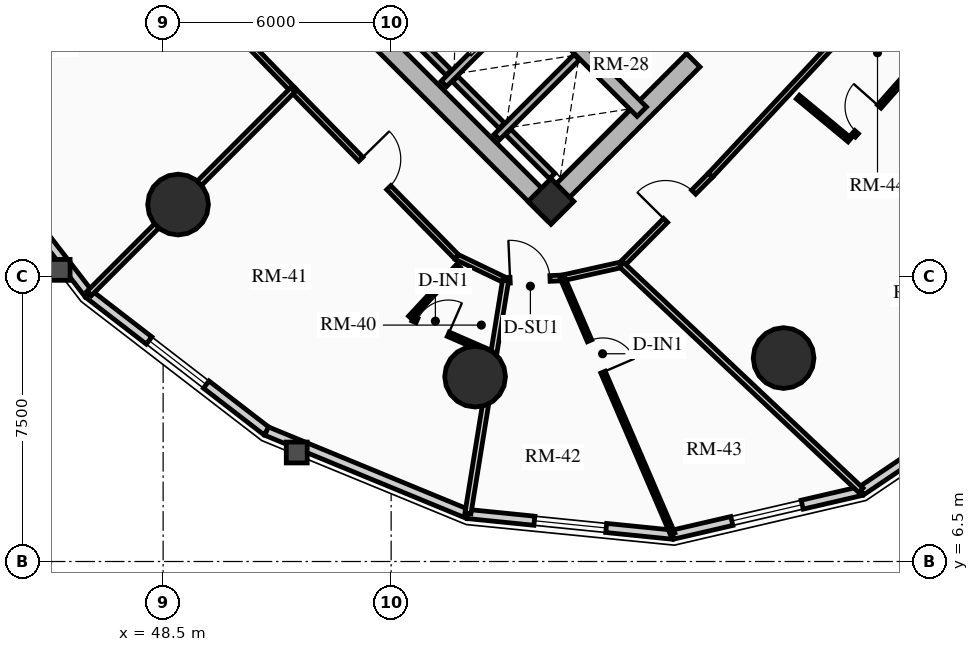
"""IFC4 building model, lengths in metres.
Left out: names, types, materials, properties, quantities, classifications, styles, units other than length and angle.
Written with IfcOpenShell. Run it as: python <this file> out.ifc"""

import sys

from ifc_helpers import new_model, si_unit, direction, frame, frame_2d, origin, origin_2d, place, context, subcontext, project, spatial, rectangle, circle, extrude, source, transform, mapped, element, fill, save


model = new_model("IFC4")
c1 = context("Model", 3, precision=1e-05, world=origin(), true_north=direction((0.0, 1.0)))
c2 = subcontext(c1, "Body", "Model", "MODEL_VIEW")
j1 = project(units=[si_unit("LENGTHUNIT", "METRE"), si_unit("PLANEANGLEUNIT", "RADIAN")], contexts=[c1])
p1 = place(None, origin())
s1 = spatial("IfcSite", under=j1, at=p1, CompositionType="ELEMENT")
p2 = place(p1, origin())
s2 = spatial("IfcBuilding", under=s1, at=p2, CompositionType="ELEMENT")
p3 = place(p2, frame((0.0, 0.0, 36.55)))
s3 = spatial("IfcBuildingStorey", under=s2, at=p3, CompositionType="ELEMENT", Elevation=36.55)
p4 = place(p3, frame((58.773, 15.661, 0.0), z_axis=(0.0, 0.0, 1.0), x_axis=(-0.707106781187, 0.707106781187, 0.0)))
e1 = element("IfcWall", 1, at=p4, inside=s3, PredefinedType="SHEAR", context=c2, shape_type="SweptSolid", body=[
    extrude(rectangle(XDim=14.3, YDim=0.5, at=frame_2d((7.15, 0.0))), origin(), (0.0, 0.0, 1.0), 2.91),
])
p5 = place(p3, frame((58.596, 15.838, 0.0), z_axis=(0.0, 0.0, 1.0), x_axis=(0.707106781187, 0.707106781187, 0.0)))
e2 = element("IfcWall", 2, at=p5, inside=s3, PredefinedType="SHEAR", context=c2, shape_type="SweptSolid", body=[
    extrude(rectangle(XDim=10.7, YDim=0.5, at=frame_2d((5.35, 0.0))), origin(), (0.0, 0.0, 1.0), 2.91),
])
m1 = source(origin(), c2, "Body", "SweptSolid", [
    extrude(rectangle(XDim=1.5, YDim=2.02, at=frame_2d((0.75, 1.01))), frame((0.0, 0.26, 0.0), z_axis=(0.0, -1.0, 0.0), x_axis=(1.0, 0.0, 0.0)), (0.0, 0.0, 1.0), 0.52),
])
p6 = place(p5, frame((5.45, 0.0, 0.0)))
e3 = element("IfcOpeningElement", 3, at=p6, cuts=e2, PredefinedType="OPENING", context=c2, shape_type="MappedRepresentation", body=[
    mapped(m1, transform((0.0, 0.0, 0.0), x_axis=(1.0, 0.0, 0.0), y_axis=(0.0, 1.0, 0.0), z_axis=(0.0, 0.0, 1.0), scale=1.0)),
])
p7 = place(p3, frame((61.096, 18.338, 0.0), z_axis=(0.0, 0.0, 1.0), x_axis=(-0.707106781187, 0.707106781187, 0.0)))
e4 = element("IfcWall", 4, at=p7, inside=s3, PredefinedType="SHEAR", context=c2, shape_type="SweptSolid", body=[
    extrude(rectangle(XDim=13.8, YDim=0.35, at=frame_2d((6.9, 0.0))), origin(), (0.0, 0.0, 1.0), 2.91),
])
m2 = source(origin(), c2, "Body", "SweptSolid", [
    extrude(rectangle(XDim=1.1, YDim=2.015, at=frame_2d((0.55, 1.007))), frame((0.0, 0.185, 0.0), z_axis=(0.0, -1.0, 0.0), x_axis=(1.0, 0.0, 0.0)), (0.0, 0.0, 1.0), 0.37),
])
p8 = place(p7, frame((4.9, 0.0, 0.0)))
e5 = element("IfcOpeningElement", 5, at=p8, cuts=e4, PredefinedType="OPENING", context=c2, shape_type="MappedRepresentation", body=[
    mapped(m2, transform((0.0, 0.0, 0.0), x_axis=(1.0, 0.0, 0.0), y_axis=(0.0, 1.0, 0.0), z_axis=(0.0, 0.0, 1.0), scale=1.0)),
])
m3 = source(origin(), c2, "Body", "SweptSolid", [
    extrude(rectangle(XDim=1.15, YDim=2.02, at=frame_2d((0.575, 1.01))), frame((0.0, 0.185, 0.0), z_axis=(0.0, -1.0, 0.0), x_axis=(1.0, 0.0, 0.0)), (0.0, 0.0, 1.0), 0.37),
])
p9 = place(p7, frame((7.32, 0.0, 0.0)))
e6 = element("IfcOpeningElement", 6, at=p9, cuts=e4, PredefinedType="OPENING", context=c2, shape_type="MappedRepresentation", body=[
    mapped(m3, transform((0.0, 0.0, 0.0), x_axis=(1.0, 0.0, 0.0), y_axis=(0.0, 1.0, 0.0), z_axis=(0.0, 0.0, 1.0), scale=1.0)),
])
p10 = place(p3, frame((58.706, 15.976, 0.0), z_axis=(0.0, 0.0, 1.0), x_axis=(0.707106781187, 0.707106781187, 0.0)))
e7 = element("IfcColumn", 7, at=p10, inside=s3, PredefinedType="COLUMN", context=c2, shape_type="SweptSolid", body=[
    extrude(rectangle(XDim=0.85, YDim=0.85, at=origin_2d()), origin(), (0.0, 0.0, 1.0), 2.91),
])
for number, where, z_axis, x_axis in (
    (8, (48.893, 15.893, 0.0), (0.0, 0.0, 1.0), (1.0, 0.0, 0.0)),
    (9, (56.709, 11.365, 0.0), (0.0, 0.0, 1.0), (1.0, 0.0, 0.0)),
    (10, (64.827, 11.854, 0.0), (0.0, 0.0, 1.0), (1.0, 0.0, 0.0)),
):
    element("IfcColumn", number, at=place(p3, frame(where, z_axis=z_axis, x_axis=x_axis)), inside=s3, PredefinedType="USERDEFINED", context=c2, shape_type="SweptSolid", body=[
        extrude(circle(Radius=0.8, at=origin_2d()), origin(), (0.0, 0.0, 1.0), 2.91),
    ])
p11 = place(p3, frame((46.541, 13.541, 0.0), z_axis=(0.0, 0.0, 1.0), x_axis=(-0.610494906082, 0.792020182601, 0.0)))
e11 = element("IfcWall", 11, at=p11, inside=s3, PredefinedType="SOLIDWALL", context=c2, shape_type="SweptSolid", body=[
    extrude(rectangle(XDim=5.911, YDim=0.24, at=frame_2d((2.956, 0.0))), origin(), (0.0, 0.0, 1.0), 2.073),
])
p12 = place(p3, frame((51.222, 9.932, 0.0), z_axis=(0.0, 0.0, 1.0), x_axis=(-0.792020182601, 0.610494906082, 0.0)))
e12 = element("IfcWall", 12, at=p12, inside=s3, PredefinedType="SOLIDWALL", context=c2, shape_type="SweptSolid", body=[
    extrude(rectangle(XDim=5.911, YDim=0.24, at=frame_2d((2.956, 0.0))), origin(), (0.0, 0.0, 1.0), 2.073),
])
m4 = source(origin(), c2, "Body", "SweptSolid", [
    extrude(rectangle(XDim=1.9, YDim=1.35, at=frame_2d((0.95, 0.675))), frame((0.0, 0.13, 0.0), z_axis=(0.0, -1.0, 0.0), x_axis=(1.0, 0.0, 0.0)), (0.0, 0.0, 1.0), 0.26),
])
p13 = place(p12, frame((2.005, 0.0, 0.65)))
e13 = element("IfcOpeningElement", 13, at=p13, cuts=e12, PredefinedType="OPENING", context=c2, shape_type="MappedRepresentation", body=[
    mapped(m4, transform((0.0, 0.0, 0.0), x_axis=(1.0, 0.0, 0.0), y_axis=(0.0, 1.0, 0.0), z_axis=(0.0, 0.0, 1.0), scale=1.0)),
])
p14 = place(p3, frame((56.518, 7.749, 0.0), z_axis=(0.0, 0.0, 1.0), x_axis=(-0.924542988536, 0.381077764176, 0.0)))
e14 = element("IfcWall", 14, at=p14, inside=s3, PredefinedType="SOLIDWALL", context=c2, shape_type="SweptSolid", body=[
    extrude(rectangle(XDim=5.728, YDim=0.24, at=frame_2d((2.864, 0.0))), origin(), (0.0, 0.0, 1.0), 2.073),
])
p15 = place(p3, frame((61.91, 7.206, 0.0), z_axis=(0.0, 0.0, 1.0), x_axis=(-0.994968263437, 0.100190592135, 0.0)))
e15 = element("IfcWall", 15, at=p15, inside=s3, PredefinedType="SOLIDWALL", context=c2, shape_type="SweptSolid", body=[
    extrude(rectangle(XDim=5.419, YDim=0.24, at=frame_2d((2.71, 0.0))), origin(), (0.0, 0.0, 1.0), 2.073),
])
p16 = place(p15, frame((1.76, 0.0, 0.65)))
e16 = element("IfcOpeningElement", 16, at=p16, cuts=e15, PredefinedType="OPENING", context=c2, shape_type="MappedRepresentation", body=[
    mapped(m4, transform((0.0, 0.0, 0.0), x_axis=(1.0, 0.0, 0.0), y_axis=(0.0, 1.0, 0.0), z_axis=(0.0, 0.0, 1.0), scale=1.0)),
])
p17 = place(p3, frame((66.871, 8.356, 0.0), z_axis=(0.0, 0.0, 1.0), x_axis=(-0.974167686491, -0.22582585901, 0.0)))
e17 = element("IfcWall", 17, at=p17, inside=s3, PredefinedType="SOLIDWALL", context=c2, shape_type="SweptSolid", body=[
    extrude(rectangle(XDim=5.092, YDim=0.24, at=frame_2d((2.546, 0.0))), origin(), (0.0, 0.0, 1.0), 2.073),
])
p18 = place(p17, frame((1.596, 0.0, 0.65)))
e18 = element("IfcOpeningElement", 18, at=p18, cuts=e17, PredefinedType="OPENING", context=c2, shape_type="MappedRepresentation", body=[
    mapped(m4, transform((0.0, 0.0, 0.0), x_axis=(1.0, 0.0, 0.0), y_axis=(0.0, 1.0, 0.0), z_axis=(0.0, 0.0, 1.0), scale=1.0)),
])
p19 = place(p3, frame((70.914, 11.086, 0.0), z_axis=(0.0, 0.0, 1.0), x_axis=(-0.828748297084, -0.559621532896, 0.0)))
e19 = element("IfcWall", 19, at=p19, inside=s3, PredefinedType="SOLIDWALL", context=c2, shape_type="SweptSolid", body=[
    extrude(rectangle(XDim=4.879, YDim=0.24, at=frame_2d((2.439, 0.0))), origin(), (0.0, 0.0, 1.0), 2.073),
])
p20 = place(p3, frame((55.888, 19.069, 0.0), z_axis=(0.0, 0.0, 1.0), x_axis=(0.707106781187, 0.707106781187, 0.0)))
e20 = element("IfcWall", 20, at=p20, inside=s3, PredefinedType="SHEAR", context=c2, shape_type="SweptSolid", body=[
    extrude(rectangle(XDim=2.97, YDim=0.2, at=frame_2d((1.485, 0.0))), origin(), (0.0, 0.0, 1.0), 2.91),
])
p21 = place(p3, frame((56.015, 19.366, 0.0), z_axis=(0.0, 0.0, 1.0), x_axis=(-0.707106781187, 0.707106781187, 0.0)))
e21 = element("IfcWall", 21, at=p21, inside=s3, PredefinedType="SHEAR", context=c2, shape_type="SweptSolid", body=[
    extrude(rectangle(XDim=2.44, YDim=0.2, at=frame_2d((1.22, 0.0))), origin(), (0.0, 0.0, 1.0), 2.91),
])
p22 = place(p3, frame((57.284, 17.673, 0.0), z_axis=(0.0, 0.0, 1.0), x_axis=(0.707147878904, 0.70706568108, 0.0)))
e22 = element("IfcWall", 22, at=p22, inside=s3, PredefinedType="SHEAR", context=c2, shape_type="SweptSolid", body=[
    extrude(rectangle(XDim=2.97, YDim=0.2, at=frame_2d((1.485, 0.0))), origin(), (0.0, 0.0, 1.0), 2.91),
])
p23 = place(p3, frame((57.412, 17.97, 0.0), z_axis=(0.0, 0.0, 1.0), x_axis=(-0.707106781187, 0.707106781187, 0.0)))
e23 = element("IfcWall", 23, at=p23, inside=s3, PredefinedType="SHEAR", context=c2, shape_type="SweptSolid", body=[
    extrude(rectangle(XDim=1.735, YDim=0.2, at=frame_2d((0.867, 0.0))), origin(), (0.0, 0.0, 1.0), 2.91),
])
p24 = place(p3, frame((58.737, 16.644, 0.0), z_axis=(0.0, 0.0, 1.0), x_axis=(-0.707032117043, 0.707181437447, 0.0)))
e24 = element("IfcWall", 24, at=p24, inside=s3, PredefinedType="SHEAR", context=c2, shape_type="SweptSolid", body=[
    extrude(rectangle(XDim=1.635, YDim=0.2, at=frame_2d((0.817, 0.0))), origin(), (0.0, 0.0, 1.0), 2.91),
])
p25 = place(p3, frame((47.706, 23.253, 0.0), z_axis=(0.0, 0.0, 1.0), x_axis=(0.696179266346, -0.717867974707, 0.0)))
e25 = element("IfcWall", 25, at=p25, inside=s3, PredefinedType="PARTITIONING", context=c2, shape_type="SweptSolid", body=[
    extrude(rectangle(XDim=6.045, YDim=0.15, at=frame_2d((3.022, 0.0))), origin(), (0.0, 0.0, 1.0), 2.635),
])
m5 = source(origin(), c2, "Body", "SweptSolid", [
    extrude(rectangle(XDim=1.05, YDim=2.015, at=frame_2d((0.525, 1.007))), frame((0.0, 0.085, 0.0), z_axis=(0.0, -1.0, 0.0), x_axis=(1.0, 0.0, 0.0)), (0.0, 0.0, 1.0), 0.17),
])
p26 = place(p25, frame((2.497, 0.0, 0.0)))
e26 = element("IfcOpeningElement", 26, at=p26, cuts=e25, PredefinedType="OPENING", context=c2, shape_type="MappedRepresentation", body=[
    mapped(m5, transform((0.0, 0.0, 0.0), x_axis=(1.0, 0.0, 0.0), y_axis=(0.0, 1.0, 0.0), z_axis=(0.0, 0.0, 1.0), scale=1.0)),
])
p27 = place(p3, frame((51.914, 18.914, 0.0), z_axis=(0.0, 0.0, 1.0), x_axis=(0.699999313799, -0.714143515465, 0.0)))
e27 = element("IfcWall", 27, at=p27, inside=s3, PredefinedType="PARTITIONING", context=c2, shape_type="SweptSolid", body=[
    extrude(rectangle(XDim=6.162, YDim=0.15, at=frame_2d((3.081, 0.0))), origin(), (0.0, 0.0, 1.0), 2.159),
])
p28 = place(p27, frame((2.556, 0.0, 0.0)))
e28 = element("IfcOpeningElement", 28, at=p28, cuts=e27, PredefinedType="OPENING", context=c2, shape_type="MappedRepresentation", body=[
    mapped(m5, transform((0.0, 0.0, 0.0), x_axis=(1.0, 0.0, 0.0), y_axis=(0.0, 1.0, 0.0), z_axis=(0.0, 0.0, 1.0), scale=1.0)),
])
p29 = place(p3, frame((56.227, 14.513, 0.0), z_axis=(0.0, 0.0, 1.0), x_axis=(0.901477579283, -0.432825801044, 0.0)))
e29 = element("IfcWall", 29, at=p29, inside=s3, PredefinedType="PARTITIONING", context=c2, shape_type="SweptSolid", body=[
    extrude(rectangle(XDim=1.424, YDim=0.15, at=frame_2d((0.712, 0.0))), origin(), (0.0, 0.0, 1.0), 2.205),
])
p30 = place(p3, frame((57.511, 13.897, 0.0), z_axis=(0.0, 0.0, 1.0), x_axis=(0.999024538494, 0.044158481476, 0.0)))
e30 = element("IfcWall", 30, at=p30, inside=s3, PredefinedType="PARTITIONING", context=c2, shape_type="SweptSolid", body=[
    extrude(rectangle(XDim=1.498, YDim=0.15, at=frame_2d((0.749, 0.0))), origin(), (0.0, 0.0, 1.0), 2.159),
])
p31 = place(p30, frame((0.12, 0.0, 0.0)))
e31 = element("IfcOpeningElement", 31, at=p31, cuts=e30, PredefinedType="OPENING", context=c2, shape_type="MappedRepresentation", body=[
    mapped(m5, transform((0.0, 0.0, 0.0), x_axis=(1.0, 0.0, 0.0), y_axis=(0.0, 1.0, 0.0), z_axis=(0.0, 0.0, 1.0), scale=1.0)),
])
p32 = place(p3, frame((59.008, 13.963, 0.0), z_axis=(0.0, 0.0, 1.0), x_axis=(0.976020856791, 0.21767702476, 0.0)))
e32 = element("IfcWall", 32, at=p32, inside=s3, PredefinedType="PARTITIONING", context=c2, shape_type="SweptSolid", body=[
    extrude(rectangle(XDim=1.593, YDim=0.15, at=frame_2d((0.796, 0.0))), origin(), (0.0, 0.0, 1.0), 2.205),
])
p33 = place(p3, frame((60.562, 14.31, 0.0), z_axis=(0.0, 0.0, 1.0), x_axis=(0.704566236161, 0.709638230975, 0.0)))
e33 = element("IfcWall", 33, at=p33, inside=s3, PredefinedType="PARTITIONING", context=c2, shape_type="SweptSolid", body=[
    extrude(rectangle(XDim=3.321, YDim=0.15, at=frame_2d((1.661, 0.0))), origin(), (0.0, 0.0, 1.0), 2.159),
])
p34 = place(p33, frame((1.643, 0.0, 0.0)))
e34 = element("IfcOpeningElement", 34, at=p34, cuts=e33, PredefinedType="OPENING", context=c2, shape_type="MappedRepresentation", body=[
    mapped(m5, transform((0.0, 0.0, 0.0), x_axis=(1.0, 0.0, 0.0), y_axis=(0.0, 1.0, 0.0), z_axis=(0.0, 0.0, 1.0), scale=1.0)),
])
p35 = place(p3, frame((62.903, 16.667, 0.0), z_axis=(0.0, 0.0, 1.0), x_axis=(0.682371947497, 0.731005147225, 0.0)))
e35 = element("IfcWall", 35, at=p35, inside=s3, PredefinedType="PARTITIONING", context=c2, shape_type="SweptSolid", body=[
    extrude(rectangle(XDim=6.642, YDim=0.15, at=frame_2d((3.321, 0.0))), origin(), (0.0, 0.0, 1.0), 2.159),
])
p36 = place(p3, frame((51.914, 18.914, 0.0), z_axis=(0.0, 0.0, 1.0), x_axis=(-0.707106781187, -0.707106781187, 0.0)))
e36 = element("IfcWall", 36, at=p36, inside=s3, PredefinedType="PARTITIONING", context=c2, shape_type="SweptSolid", body=[
    extrude(rectangle(XDim=7.579, YDim=0.16, at=frame_2d((3.79, 0.0))), origin(), (0.0, 0.0, 1.0), 2.073),
])
p37 = place(p3, frame((57.511, 13.897, 0.0), z_axis=(0.0, 0.0, 1.0), x_axis=(-0.159485929017, -0.987200201806, 0.0)))
e37 = element("IfcWall", 37, at=p37, inside=s3, PredefinedType="PARTITIONING", context=c2, shape_type="SweptSolid", body=[
    extrude(rectangle(XDim=6.207, YDim=0.16, at=frame_2d((3.104, 0.0))), origin(), (0.0, 0.0, 1.0), 2.073),
])
p38 = place(p3, frame((60.562, 14.31, 0.0), z_axis=(0.0, 0.0, 1.0), x_axis=(0.727781661561, -0.685808904211, 0.0)))
e38 = element("IfcWall", 38, at=p38, inside=s3, PredefinedType="PARTITIONING", context=c2, shape_type="SweptSolid", body=[
    extrude(rectangle(XDim=8.655, YDim=0.16, at=frame_2d((4.328, 0.0))), origin(), (0.0, 0.0, 1.0), 2.073),
])
p39 = place(p3, frame((67.435, 21.521, 0.0), z_axis=(0.0, 0.0, 1.0), x_axis=(0.6962628802, -0.717786877601, 0.0)))
e39 = element("IfcWall", 39, at=p39, inside=s3, PredefinedType="PARTITIONING", context=c2, shape_type="SweptSolid", body=[
    extrude(rectangle(XDim=8.893, YDim=0.16, at=frame_2d((4.446, 0.0))), origin(), (0.0, 0.0, 1.0), 2.073),
])
p40 = place(p3, frame((56.274, 14.283, 0.0), z_axis=(0.0, 0.0, 1.0), x_axis=(-0.679968993343, -0.733240866354, 0.0)))
e40 = element("IfcWall", 40, at=p40, inside=s3, PredefinedType="PARTITIONING", context=c2, shape_type="SweptSolid", body=[
    extrude(rectangle(XDim=1.865, YDim=0.125, at=frame_2d((0.933, 0.0))), origin(), (0.0, 0.0, 1.0), 2.205),
])
p41 = place(p3, frame((55.069, 12.888, 0.0), z_axis=(0.0, 0.0, 1.0), x_axis=(0.916790743628, -0.399367916085, 0.0)))
e41 = element("IfcWall", 41, at=p41, inside=s3, PredefinedType="PARTITIONING", context=c2, shape_type="SweptSolid", body=[
    extrude(rectangle(XDim=2.225, YDim=0.125, at=frame_2d((1.113, 0.0))), origin(), (0.0, 0.0, 1.0), 2.159),
])
m6 = source(origin(), c2, "Body", "SweptSolid", [
    extrude(rectangle(XDim=0.9, YDim=2.005, at=frame_2d((0.45, 1.002))), frame((0.0, 0.073, 0.0), z_axis=(0.0, -1.0, 0.0), x_axis=(1.0, 0.0, 0.0)), (0.0, 0.0, 1.0), 0.145),
])
p42 = place(p41, frame((0.12, 0.0, 0.0)))
e42 = element("IfcOpeningElement", 42, at=p42, cuts=e41, PredefinedType="OPENING", context=c2, shape_type="MappedRepresentation", body=[
    mapped(m6, transform((0.0, 0.0, 0.0), x_axis=(1.0, 0.0, 0.0), y_axis=(0.0, 1.0, 0.0), z_axis=(0.0, 0.0, 1.0), scale=1.0)),
])
p43 = place(p3, frame((59.008, 13.963, 0.0), z_axis=(0.0, 0.0, 1.0), x_axis=(0.395256697593, -0.918570706592, 0.0)))
e43 = element("IfcWall", 43, at=p43, inside=s3, PredefinedType="PARTITIONING", context=c2, shape_type="SweptSolid", body=[
    extrude(rectangle(XDim=7.334, YDim=0.125, at=frame_2d((3.667, 0.0))), origin(), (0.0, 0.0, 1.0), 2.073),
])
p44 = place(p43, frame((1.8, 0.0, 0.0)))
e44 = element("IfcOpeningElement", 44, at=p44, cuts=e43, PredefinedType="OPENING", context=c2, shape_type="MappedRepresentation", body=[
    mapped(m6, transform((0.0, 0.0, 0.0), x_axis=(1.0, 0.0, 0.0), y_axis=(0.0, 1.0, 0.0), z_axis=(0.0, 0.0, 1.0), scale=1.0)),
])
p45 = place(p3, frame((65.202, 18.721, 0.0), z_axis=(0.0, 0.0, 1.0), x_axis=(0.769814202386, -0.638268042287, 0.0)))
e45 = element("IfcWall", 45, at=p45, inside=s3, PredefinedType="PARTITIONING", context=c2, shape_type="SweptSolid", body=[
    extrude(rectangle(XDim=1.769, YDim=0.125, at=frame_2d((0.884, 0.0))), origin(), (0.0, 0.0, 1.0), 2.635),
])
p46 = place(p3, frame((66.667, 17.709, 0.0), z_axis=(0.0, 0.0, 1.0), x_axis=(0.662510581678, 0.749052554341, 0.0)))
e46 = element("IfcWall", 46, at=p46, inside=s3, PredefinedType="PARTITIONING", context=c2, shape_type="SweptSolid", body=[
    extrude(rectangle(XDim=2.996, YDim=0.125, at=frame_2d((1.498, 0.0))), origin(), (0.0, 0.0, 1.0), 2.159),
])
p47 = place(p46, frame((0.12, 0.0, 0.0)))
e47 = element("IfcOpeningElement", 47, at=p47, cuts=e46, PredefinedType="OPENING", context=c2, shape_type="MappedRepresentation", body=[
    mapped(m6, transform((0.0, 0.0, 0.0), x_axis=(1.0, 0.0, 0.0), y_axis=(0.0, 1.0, 0.0), z_axis=(0.0, 0.0, 1.0), scale=1.0)),
])
m7 = source(origin(), c2, "Body", "SweptSolid", [
    extrude(rectangle(XDim=1.9, YDim=1.35, at=frame_2d((0.95, 0.675))), frame((0.0, 0.03, 0.0), z_axis=(0.0, -1.0, 0.0), x_axis=(1.0, 0.0, 0.0)), (0.0, 0.0, 1.0), 0.06),
])
p48 = place(p13, origin())
e48 = element("IfcWindow", 48, at=p48, inside=s3, PartitioningType="DOUBLE_PANEL_VERTICAL", PredefinedType="WINDOW", context=c2, shape_type="MappedRepresentation", body=[
    mapped(m7, transform((0.0, 0.0, 0.0), x_axis=(1.0, 0.0, 0.0), y_axis=(0.0, 1.0, 0.0), z_axis=(0.0, 0.0, 1.0), scale=1.0)),
])
fill(e13, e48)
p49 = place(p16, origin())
e49 = element("IfcWindow", 49, at=p49, inside=s3, PartitioningType="DOUBLE_PANEL_VERTICAL", PredefinedType="WINDOW", context=c2, shape_type="MappedRepresentation", body=[
    mapped(m7, transform((0.0, 0.0, 0.0), x_axis=(1.0, 0.0, 0.0), y_axis=(0.0, 1.0, 0.0), z_axis=(0.0, 0.0, 1.0), scale=1.0)),
])
fill(e16, e49)
p50 = place(p18, origin())
e50 = element("IfcWindow", 50, at=p50, inside=s3, PartitioningType="DOUBLE_PANEL_VERTICAL", PredefinedType="WINDOW", context=c2, shape_type="MappedRepresentation", body=[
    mapped(m7, transform((0.0, 0.0, 0.0), x_axis=(1.0, 0.0, 0.0), y_axis=(0.0, 1.0, 0.0), z_axis=(0.0, 0.0, 1.0), scale=1.0)),
])
fill(e18, e50)
m8 = source(origin(), c2, "Body", "SweptSolid", [
    extrude(rectangle(XDim=1.5, YDim=2.02, at=frame_2d((0.75, 1.01))), frame((0.0, 0.025, 0.0), z_axis=(0.0, -1.0, 0.0), x_axis=(1.0, 0.0, 0.0)), (0.0, 0.0, 1.0), 0.05),
])
p51 = place(p6, origin())
e51 = element("IfcDoor", 51, at=p51, inside=s3, OperationType="DOUBLE_DOOR_SINGLE_SWING", PredefinedType="DOOR", context=c2, shape_type="MappedRepresentation", body=[
    mapped(m8, transform((0.0, 0.0, 0.0), x_axis=(1.0, 0.0, 0.0), y_axis=(0.0, 1.0, 0.0), z_axis=(0.0, 0.0, 1.0), scale=1.0)),
])
fill(e3, e51)
m9 = source(origin(), c2, "Body", "SweptSolid", [
    extrude(rectangle(XDim=1.05, YDim=2.015, at=frame_2d((0.525, 1.007))), frame((0.0, 0.025, 0.0), z_axis=(0.0, -1.0, 0.0), x_axis=(1.0, 0.0, 0.0)), (0.0, 0.0, 1.0), 0.05),
])
p52 = place(p28, origin())
e52 = element("IfcDoor", 52, at=p52, inside=s3, OperationType="SINGLE_SWING_LEFT", PredefinedType="DOOR", context=c2, shape_type="MappedRepresentation", body=[
    mapped(m9, transform((0.0, 0.0, 0.0), x_axis=(1.0, 0.0, 0.0), y_axis=(0.0, 1.0, 0.0), z_axis=(0.0, 0.0, 1.0), scale=1.0)),
])
fill(e28, e52)
m10 = source(origin(), c2, "Body", "SweptSolid", [
    extrude(rectangle(XDim=0.9, YDim=2.005, at=frame_2d((0.45, 1.002))), frame((0.0, 0.025, 0.0), z_axis=(0.0, -1.0, 0.0), x_axis=(1.0, 0.0, 0.0)), (0.0, 0.0, 1.0), 0.05),
])
p53 = place(p42, origin())
e53 = element("IfcDoor", 53, at=p53, inside=s3, OperationType="SINGLE_SWING_RIGHT", PredefinedType="DOOR", context=c2, shape_type="MappedRepresentation", body=[
    mapped(m10, transform((0.0, 0.0, 0.0), x_axis=(1.0, 0.0, 0.0), y_axis=(0.0, 1.0, 0.0), z_axis=(0.0, 0.0, 1.0), scale=1.0)),
])
fill(e42, e53)
p54 = place(p31, origin())
e54 = element("IfcDoor", 54, at=p54, inside=s3, OperationType="SINGLE_SWING_LEFT", PredefinedType="DOOR", context=c2, shape_type="MappedRepresentation", body=[
    mapped(m9, transform((0.0, 0.0, 0.0), x_axis=(1.0, 0.0, 0.0), y_axis=(0.0, 1.0, 0.0), z_axis=(0.0, 0.0, 1.0), scale=1.0)),
])
fill(e31, e54)
p55 = place(p44, origin())
e55 = element("IfcDoor", 55, at=p55, inside=s3, OperationType="SINGLE_SWING_RIGHT", PredefinedType="DOOR", context=c2, shape_type="MappedRepresentation", body=[
    mapped(m10, transform((0.0, 0.0, 0.0), x_axis=(1.0, 0.0, 0.0), y_axis=(0.0, 1.0, 0.0), z_axis=(0.0, 0.0, 1.0), scale=1.0)),
])
fill(e44, e55)
p56 = place(p34, origin())
e56 = element("IfcDoor", 56, at=p56, inside=s3, OperationType="SINGLE_SWING_LEFT", PredefinedType="DOOR", context=c2, shape_type="MappedRepresentation", body=[
    mapped(m9, transform((0.0, 0.0, 0.0), x_axis=(1.0, 0.0, 0.0), y_axis=(0.0, 1.0, 0.0), z_axis=(0.0, 0.0, 1.0), scale=1.0)),
])
fill(e34, e56)
p57 = place(p47, origin())
e57 = element("IfcDoor", 57, at=p57, inside=s3, OperationType="SINGLE_SWING_RIGHT", PredefinedType="DOOR", context=c2, shape_type="MappedRepresentation", body=[
    mapped(m10, transform((0.0, 0.0, 0.0), x_axis=(1.0, 0.0, 0.0), y_axis=(0.0, 1.0, 0.0), z_axis=(0.0, 0.0, 1.0), scale=1.0)),
])
fill(e47, e57)
save(model, sys.argv[1])
